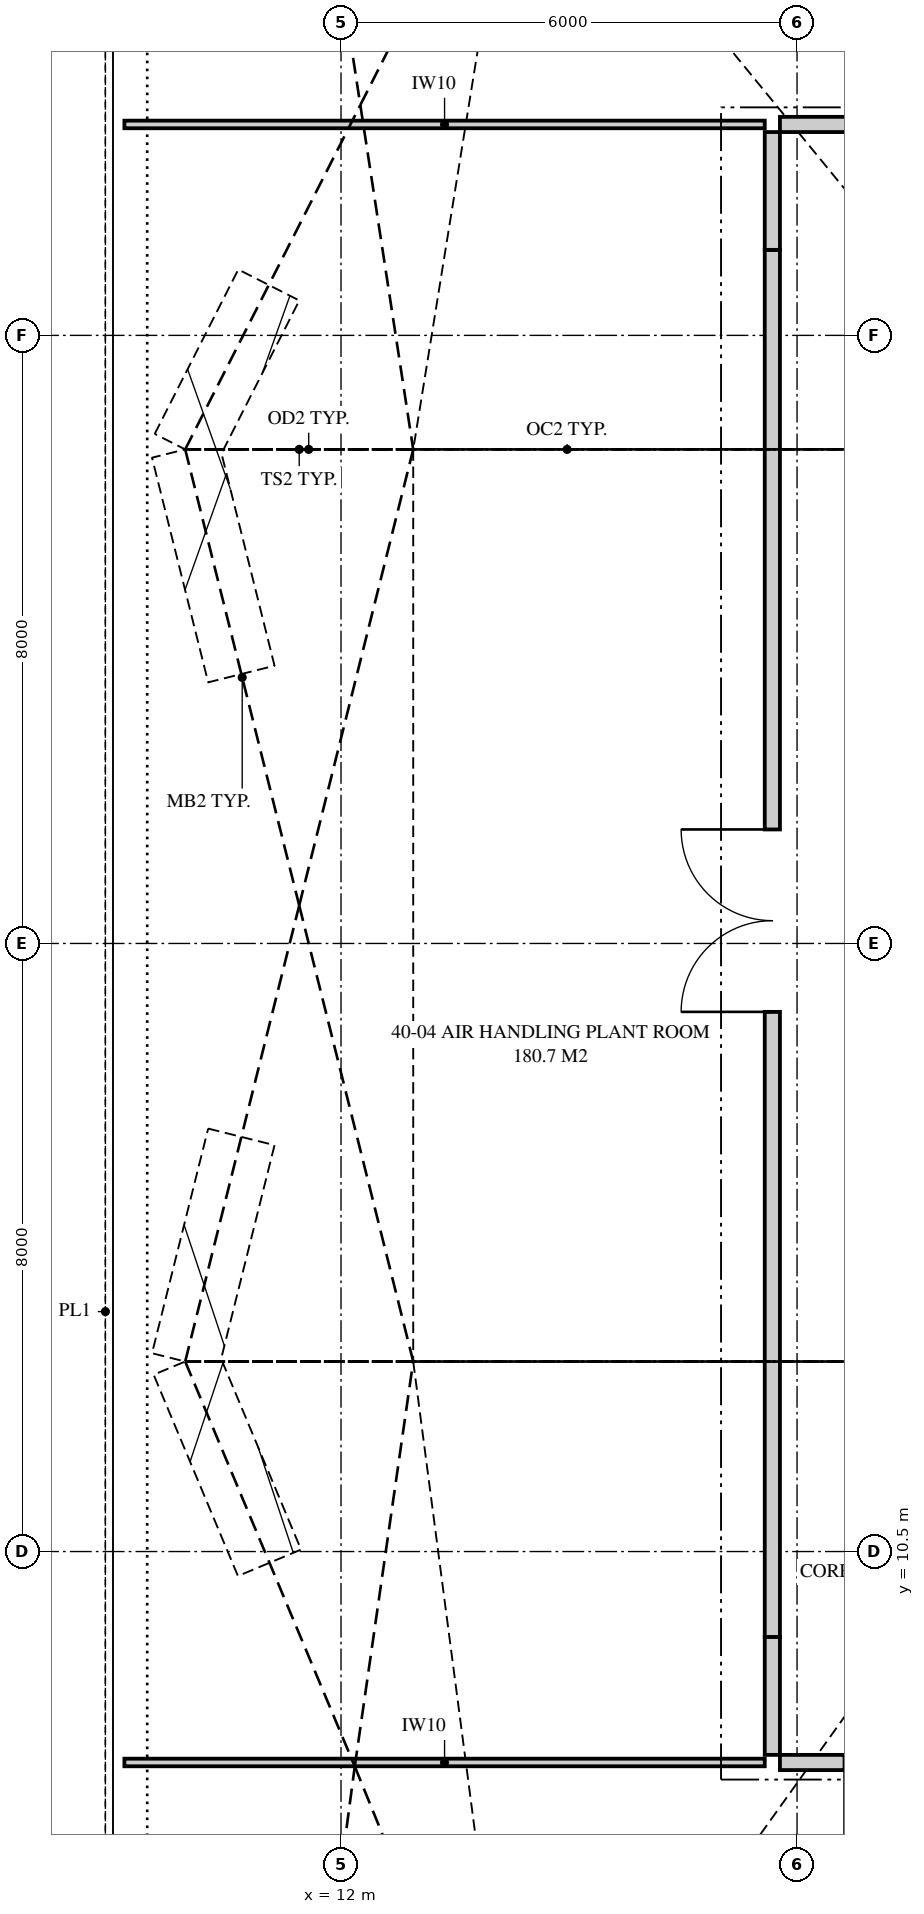
"""IFC4 building model, lengths in metres.
Left out: names, types, materials, properties, quantities, classifications, styles, units other than length and angle.
Written with IfcOpenShell. Run it as: python <this file> out.ifc"""

import sys

from ifc_helpers import new_model, si_unit, direction, frame, frame_2d, origin, place, context, subcontext, project, spatial, polyline, rectangle, outline, extrude, element, fill, save


model = new_model("IFC4")
c1 = context("Model", 3, precision=1e-05, world=origin(), true_north=direction((0.0, 1.0)))
c2 = subcontext(c1, "Body", "Model", "MODEL_VIEW")
j1 = project(units=[si_unit("LENGTHUNIT", "METRE"), si_unit("PLANEANGLEUNIT", "RADIAN")], contexts=[c1])
p1 = place(None, origin())
s1 = spatial("IfcSite", under=j1, at=p1, CompositionType="ELEMENT")
p2 = place(p1, origin())
s2 = spatial("IfcBuilding", under=s1, at=p2, CompositionType="ELEMENT")
p3 = place(p2, frame((0.0, 0.0, 149.35)))
s3 = spatial("IfcBuildingStorey", under=s2, at=p3, CompositionType="ELEMENT", Elevation=149.35)
p4 = place(p3, frame((17.775, 7.725, 0.0), z_axis=(0.0, 0.0, 1.0), x_axis=(1.0, 0.0, 0.0)))
e1 = element("IfcWall", 1, at=p4, inside=s3, PredefinedType="PARTITIONING", context=c2, shape_type="SweptSolid", body=[
    extrude(outline(polyline([(0.0, 0.0), (28.25, 0.0), (28.25, 2.52), (27.466, 2.52), (27.466, 4.72), (20.724, 4.72), (20.724, 4.141), (19.945, 4.141), (19.945, 4.72), (17.341, 4.72), (17.341, 4.141), (16.364, 4.141), (16.364, 4.72), (15.01, 4.72), (15.01, 4.208), (14.44, 4.208), (14.44, 4.72), (11.722, 4.72), (11.722, 4.141), (10.851, 4.141), (10.851, 4.72), (8.664, 4.72), (8.664, 4.141), (7.819, 4.141), (7.819, 4.72), (3.349, 4.72), (3.349, 4.141), (2.388, 4.141), (2.388, 4.72), (1.105, 4.72), (1.105, 2.52), (0.0, 2.52), (0.0, 0.0)]), holes=[polyline([(13.78, 3.239), (13.834, 3.353), (14.381, 3.423), (14.381, 2.917), (14.326, 2.803), (13.78, 2.732), (13.78, 3.239)])]), frame((0.0, 0.1, 0.0), z_axis=(0.0, -1.0, 0.0), x_axis=(1.0, 0.0, 0.0)), (0.0, 0.0, 1.0), 0.2),
])
p5 = place(p4, frame((0.85, 0.0, 0.0)))
e2 = element("IfcOpeningElement", 2, at=p5, cuts=e1, PredefinedType="OPENING", context=c2, shape_type="SweptSolid", body=[
    extrude(rectangle(XDim=1.0, YDim=2.1, at=frame_2d((0.5, 1.05))), frame((0.0, 0.11, 0.0), z_axis=(0.0, -1.0, 0.0), x_axis=(1.0, 0.0, 0.0)), (0.0, 0.0, 1.0), 0.22),
])
p6 = place(p4, frame((26.4, 0.0, 0.0)))
e3 = element("IfcOpeningElement", 3, at=p6, cuts=e1, PredefinedType="OPENING", context=c2, shape_type="SweptSolid", body=[
    extrude(rectangle(XDim=1.0, YDim=2.1, at=frame_2d((0.5, 1.05))), frame((0.0, 0.11, 0.0), z_axis=(0.0, -1.0, 0.0), x_axis=(1.0, 0.0, 0.0)), (0.0, 0.0, 1.0), 0.22),
])
p7 = place(p3, frame((17.675, 7.825, 0.0), z_axis=(0.0, 0.0, 1.0), x_axis=(0.0, 1.0, 0.0)))
e4 = element("IfcWall", 4, at=p7, inside=s3, PredefinedType="PARTITIONING", context=c2, shape_type="SweptSolid", body=[
    extrude(outline(polyline([(0.0, 0.0), (1.55, 0.0), (1.55, 4.72), (0.174, 4.72), (0.174, 2.52), (0.0, 2.52), (0.0, 0.0)])), frame((0.0, 0.1, 0.0), z_axis=(0.0, -1.0, 0.0), x_axis=(1.0, 0.0, 0.0)), (0.0, 0.0, 1.0), 0.2),
])
p8 = place(p3, frame((17.775, 29.275, 0.0), z_axis=(0.0, 0.0, 1.0), x_axis=(1.0, 0.0, 0.0)))
e5 = element("IfcWall", 5, at=p8, inside=s3, PredefinedType="PARTITIONING", context=c2, shape_type="SweptSolid", body=[
    extrude(outline(polyline([(0.0, 0.0), (28.25, 0.0), (28.25, 2.52), (27.728, 2.52), (27.728, 4.72), (20.598, 4.72), (20.598, 4.141), (19.667, 4.141), (19.667, 4.72), (15.01, 4.72), (15.01, 4.208), (14.44, 4.208), (14.44, 4.72), (11.449, 4.72), (11.449, 4.141), (10.512, 4.141), (10.512, 4.72), (8.986, 4.72), (8.986, 4.141), (8.079, 4.141), (8.079, 4.72), (3.181, 4.72), (3.181, 4.141), (2.638, 4.141), (2.638, 4.72), (0.885, 4.72), (0.885, 2.52), (0.0, 2.52), (0.0, 0.0)]), holes=[polyline([(13.78, 3.239), (13.834, 3.353), (14.381, 3.423), (14.381, 2.917), (14.326, 2.803), (13.78, 2.732), (13.78, 3.239)])]), frame((0.0, 0.1, 0.0), z_axis=(0.0, -1.0, 0.0), x_axis=(1.0, 0.0, 0.0)), (0.0, 0.0, 1.0), 0.2),
])
p9 = place(p8, frame((13.825, 0.0, 0.0)))
e6 = element("IfcOpeningElement", 6, at=p9, cuts=e5, PredefinedType="OPENING", context=c2, shape_type="SweptSolid", body=[
    extrude(rectangle(XDim=2.4, YDim=2.4, at=frame_2d((1.2, 1.2))), frame((0.0, 0.11, 0.0), z_axis=(0.0, -1.0, 0.0), x_axis=(1.0, 0.0, 0.0)), (0.0, 0.0, 1.0), 0.22),
])
p10 = place(p3, frame((17.675, 27.625, 0.0), z_axis=(0.0, 0.0, 1.0), x_axis=(0.0, 1.0, 0.0)))
e7 = element("IfcWall", 7, at=p10, inside=s3, PredefinedType="PARTITIONING", context=c2, shape_type="SweptSolid", body=[
    extrude(outline(polyline([(0.0, 0.0), (1.55, 0.0), (1.55, 2.52), (1.053, 2.52), (1.053, 4.72), (0.0, 4.72), (0.0, 0.0)])), frame((0.0, 0.1, 0.0), z_axis=(0.0, -1.0, 0.0), x_axis=(1.0, 0.0, 0.0)), (0.0, 0.0, 1.0), 0.2),
])
p11 = place(p3, frame((17.675, 9.375, 0.0), z_axis=(0.0, 0.0, 1.0), x_axis=(0.0, 1.0, 0.0)))
e8 = element("IfcWall", 8, at=p11, inside=s3, PredefinedType="PARTITIONING", context=c2, shape_type="SweptSolid", body=[
    extrude(outline(polyline([(18.25, 0.0), (18.25, 4.72), (15.975, 4.72), (15.975, 4.02), (15.275, 4.02), (15.275, 4.72), (3.975, 4.72), (3.975, 4.02), (3.275, 4.02), (3.275, 4.72), (0.0, 4.72), (0.0, 0.0), (18.25, 0.0)]), holes=[polyline([(3.396, 2.835), (3.396, 3.533), (3.854, 3.533), (3.854, 2.835), (3.396, 2.835)]), polyline([(15.396, 2.835), (15.396, 3.533), (15.854, 3.533), (15.854, 2.835), (15.396, 2.835)])]), frame((0.0, 0.1, 0.0), z_axis=(0.0, -1.0, 0.0), x_axis=(1.0, 0.0, 0.0)), (0.0, 0.0, 1.0), 0.2),
])
p12 = place(p11, frame((8.225, 0.0, 0.0)))
e9 = element("IfcOpeningElement", 9, at=p12, cuts=e8, PredefinedType="OPENING", context=c2, shape_type="SweptSolid", body=[
    extrude(rectangle(XDim=2.4, YDim=2.4, at=frame_2d((1.2, 1.2))), frame((0.0, 0.11, 0.0), z_axis=(0.0, -1.0, 0.0), x_axis=(1.0, 0.0, 0.0)), (0.0, 0.0, 1.0), 0.22),
])
p13 = place(p3, frame((9.15, 7.725, 0.0), z_axis=(0.0, 0.0, 1.0), x_axis=(1.0, 0.0, 0.0)))
e10 = element("IfcWall", 10, at=p13, inside=s3, PredefinedType="PARTITIONING", context=c2, shape_type="SweptSolid", body=[
    extrude(outline(polyline([(3.625, 4.72), (0.0, 4.72), (0.0, 0.0), (8.425, 0.0), (8.425, 2.52), (8.394, 2.52), (8.394, 4.72), (5.36, 4.72), (5.36, 3.5), (3.625, 3.5), (3.625, 4.72)]), holes=[polyline([(3.472, 1.365), (3.472, 1.365), (3.47, 1.363), (3.467, 1.358), (3.466, 1.358), (3.452, 1.342), (3.442, 1.309), (3.358, 1.303), (2.545, 1.168), (2.545, 2.055), (2.59, 2.105), (2.587, 2.108), (2.617, 2.113), (2.617, 2.152), (2.634, 2.207), (3.46, 2.262), (3.46, 2.252), (3.472, 2.254), (3.472, 1.365)])]), frame((0.0, 0.05, 0.0), z_axis=(0.0, -1.0, 0.0), x_axis=(1.0, 0.0, 0.0)), (0.0, 0.0, 1.0), 0.1),
])
p14 = place(p3, frame((9.15, 29.275, 0.0), z_axis=(0.0, 0.0, 1.0), x_axis=(1.0, 0.0, 0.0)))
e11 = element("IfcWall", 11, at=p14, inside=s3, PredefinedType="PARTITIONING", context=c2, shape_type="SweptSolid", body=[
    extrude(outline(polyline([(3.62, 4.72), (0.0, 4.72), (0.0, 0.0), (8.425, 0.0), (8.425, 2.52), (8.095, 2.52), (8.095, 4.72), (5.362, 4.72), (5.362, 3.5), (3.62, 3.5), (3.62, 4.72)]), holes=[polyline([(2.49, 1.124), (2.49, 2.04), (2.545, 2.104), (2.721, 2.144), (2.721, 2.396), (2.739, 2.457), (3.566, 2.522), (3.566, 1.608), (3.548, 1.548), (3.458, 1.541), (3.458, 1.4), (3.403, 1.337), (2.49, 1.124)])]), frame((0.0, 0.05, 0.0), z_axis=(0.0, -1.0, 0.0), x_axis=(1.0, 0.0, 0.0)), (0.0, 0.0, 1.0), 0.1),
])
p15 = place(p12, origin())
e12 = element("IfcDoor", 12, at=p15, inside=s3, OperationType="DOUBLE_DOOR_SINGLE_SWING", PredefinedType="DOOR", context=c2, shape_type="SweptSolid", body=[
    extrude(rectangle(XDim=2.4, YDim=2.4, at=frame_2d((1.2, 1.2))), frame((0.0, 0.025, 0.0), z_axis=(0.0, -1.0, 0.0), x_axis=(1.0, 0.0, 0.0)), (0.0, 0.0, 1.0), 0.05),
])
fill(e9, e12)
save(model, sys.argv[1])
